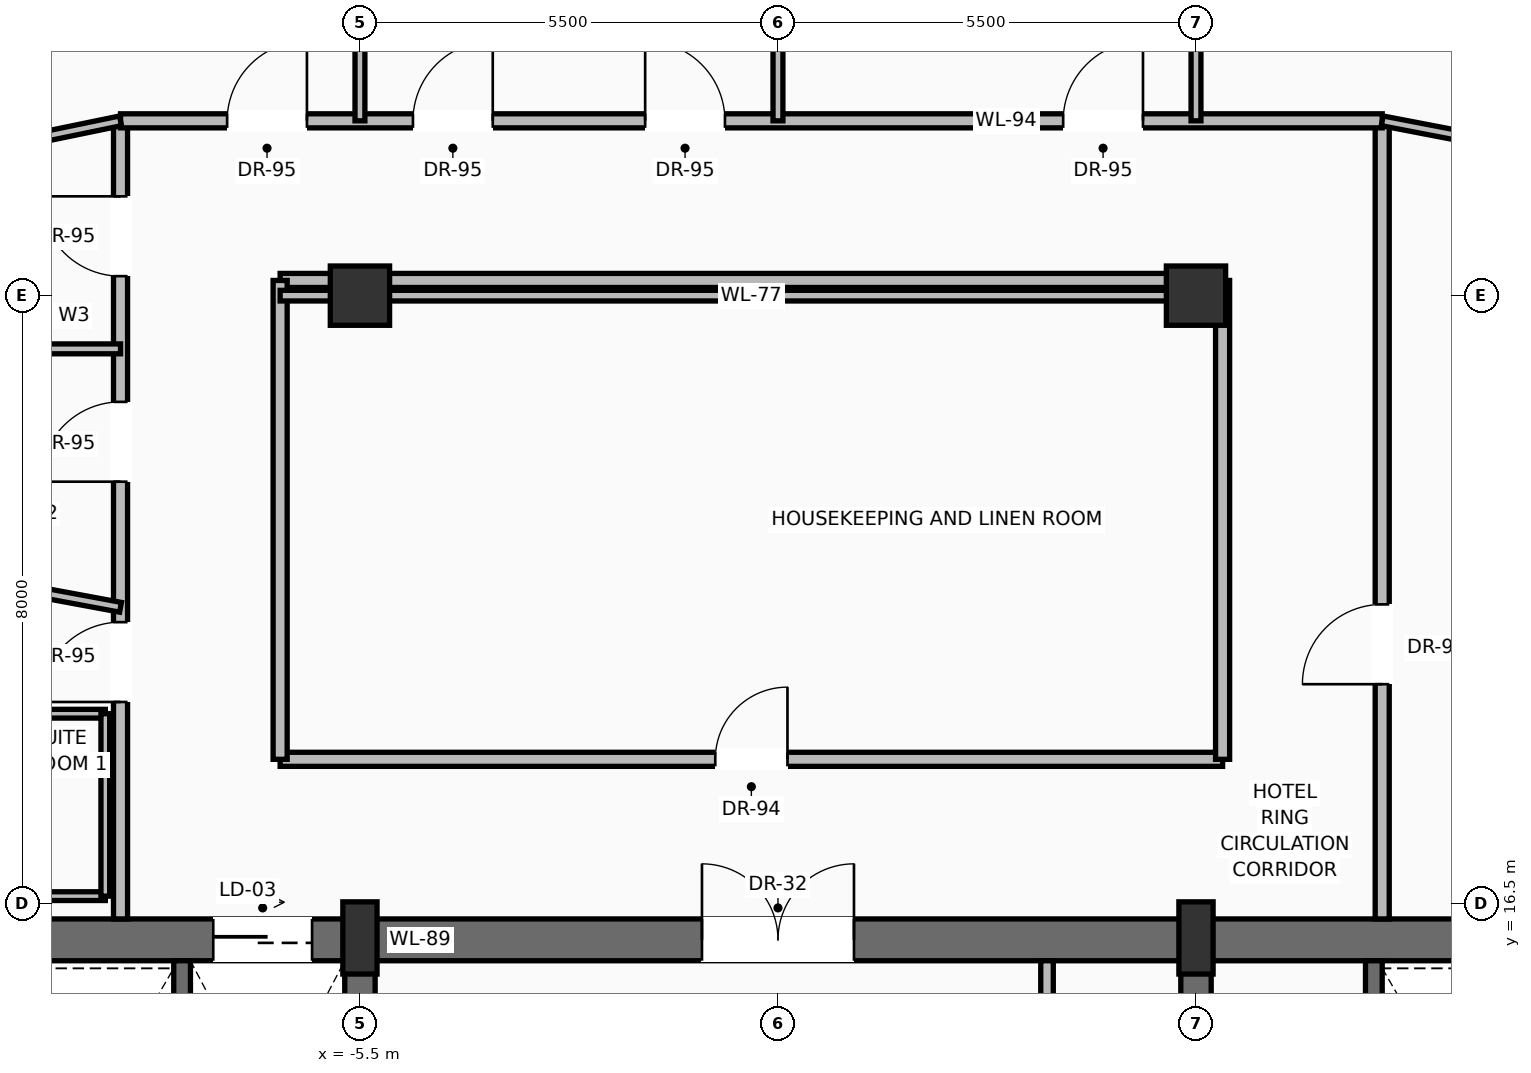
"""IFC4 building model, lengths in metres.
Left out: names, types, materials, properties, quantities, classifications, styles, units other than length and angle.
Written with IfcOpenShell. Run it as: python <this file> out.ifc"""

import sys

from ifc_helpers import new_model, si_unit, direction, frame, frame_2d, origin, origin_2d, place, context, subcontext, project, spatial, rectangle, extrude, source, transform, mapped, element, fill, save


model = new_model("IFC4")
c1 = context("Model", 3, precision=1e-05, world=origin(), true_north=direction((0.0, 1.0)))
c2 = subcontext(c1, "Body", "Model", "MODEL_VIEW")
j1 = project(units=[si_unit("LENGTHUNIT", "METRE"), si_unit("PLANEANGLEUNIT", "RADIAN")], contexts=[c1])
p1 = place(None, origin())
s1 = spatial("IfcSite", under=j1, at=p1, CompositionType="ELEMENT")
p2 = place(p1, origin())
s2 = spatial("IfcBuilding", under=s1, at=p2, CompositionType="ELEMENT")
p3 = place(p2, frame((0.0, 0.0, 230.35)))
s3 = spatial("IfcBuildingStorey", under=s2, at=p3, CompositionType="ELEMENT", Elevation=230.35)
p4 = place(p3, frame((-10.7, 16.025, 0.0), z_axis=(0.0, 0.0, 1.0), x_axis=(1.0, 0.0, 0.0)))
e1 = element("IfcWall", 1, at=p4, inside=s3, PredefinedType="SHEAR", context=c2, shape_type="SweptSolid", body=[
    extrude(rectangle(XDim=21.4, YDim=0.55, at=frame_2d((10.7, 0.0))), origin(), (0.0, 0.0, 1.0), 3.24),
])
p5 = place(p4, frame((3.27, 0.0, 0.0)))
e2 = element("IfcOpeningElement", 2, at=p5, cuts=e1, PredefinedType="OPENING", context=c2, shape_type="SweptSolid", body=[
    extrude(rectangle(XDim=1.3, YDim=2.3, at=frame_2d((0.65, 1.15))), frame((0.0, 0.285, 0.0), z_axis=(0.0, -1.0, 0.0), x_axis=(1.0, 0.0, 0.0)), (0.0, 0.0, 1.0), 0.57),
])
p6 = place(p4, frame((9.7, 0.0, 0.0)))
e3 = element("IfcOpeningElement", 3, at=p6, cuts=e1, PredefinedType="OPENING", context=c2, shape_type="SweptSolid", body=[
    extrude(rectangle(XDim=2.0, YDim=2.4, at=frame_2d((1.0, 1.2))), frame((0.0, 0.285, 0.0), z_axis=(0.0, -1.0, 0.0), x_axis=(1.0, 0.0, 0.0)), (0.0, 0.0, 1.0), 0.57),
])
p7 = place(p3, frame((-5.5, 0.575, 0.0), z_axis=(0.0, 0.0, 1.0), x_axis=(0.0, 1.0, 0.0)))
e4 = element("IfcWall", 4, at=p7, inside=s3, PredefinedType="SHEAR", context=c2, shape_type="SweptSolid", body=[
    extrude(rectangle(XDim=15.45, YDim=0.4, at=frame_2d((7.725, 0.0))), origin(), (0.0, 0.0, 1.0), 3.24),
])
p8 = place(p7, frame((8.925, 0.0, 0.0)))
e5 = element("IfcOpeningElement", 5, at=p8, cuts=e4, PredefinedType="OPENING", context=c2, shape_type="SweptSolid", body=[
    extrude(rectangle(XDim=1.1, YDim=2.2, at=frame_2d((0.55, 1.1))), frame((0.0, 0.21, 0.0), z_axis=(0.0, -1.0, 0.0), x_axis=(1.0, 0.0, 0.0)), (0.0, 0.0, 1.0), 0.42),
])
p9 = place(p3, frame((5.5, 0.575, 0.0), z_axis=(0.0, 0.0, 1.0), x_axis=(0.0, 1.0, 0.0)))
e6 = element("IfcWall", 6, at=p9, inside=s3, PredefinedType="SHEAR", context=c2, shape_type="SweptSolid", body=[
    extrude(rectangle(XDim=15.45, YDim=0.4, at=frame_2d((7.725, 0.0))), origin(), (0.0, 0.0, 1.0), 3.24),
])
p10 = place(p9, frame((8.925, 0.0, 0.0)))
e7 = element("IfcOpeningElement", 7, at=p10, cuts=e6, PredefinedType="OPENING", context=c2, shape_type="SweptSolid", body=[
    extrude(rectangle(XDim=1.1, YDim=2.2, at=frame_2d((0.55, 1.1))), frame((0.0, 0.21, 0.0), z_axis=(0.0, -1.0, 0.0), x_axis=(1.0, 0.0, 0.0)), (0.0, 0.0, 1.0), 0.42),
])
m1 = source(origin(), c2, "Body", "SweptSolid", [
    extrude(rectangle(XDim=0.45, YDim=0.95, at=origin_2d()), origin(), (0.0, 0.0, 1.0), 3.45),
])
for number, where, z_axis, x_axis in (
    (8, (-5.5, 16.05, 0.0), (0.0, 0.0, 1.0), (1.0, 0.0, 0.0)),
    (9, (5.5, 16.05, 0.0), (0.0, 0.0, 1.0), (1.0, 0.0, 0.0)),
):
    element("IfcColumn", number, at=place(p3, frame(where, z_axis=z_axis, x_axis=x_axis)), inside=s3, PredefinedType="PILASTER", context=c2, shape_type="MappedRepresentation", body=[
        mapped(m1, transform((0.0, 0.0, 0.0), scale=1.0)),
    ])
m2 = source(origin(), c2, "Body", "SweptSolid", [
    extrude(rectangle(XDim=0.78, YDim=0.78, at=origin_2d()), origin(), (0.0, 0.0, 1.0), 3.45),
])
for number, where, z_axis, x_axis in (
    (10, (-5.5, 24.5, 0.0), (0.0, 0.0, 1.0), (1.0, 0.0, 0.0)),
    (11, (5.5, 24.5, 0.0), (0.0, 0.0, 1.0), (1.0, 0.0, 0.0)),
):
    element("IfcColumn", number, at=place(p3, frame(where, z_axis=z_axis, x_axis=x_axis)), inside=s3, PredefinedType="COLUMN", context=c2, shape_type="MappedRepresentation", body=[
        mapped(m2, transform((0.0, 0.0, 0.0), scale=1.0)),
    ])
p11 = place(p3, frame((-19.586, 15.3, 0.0), z_axis=(0.0, 0.0, 1.0), x_axis=(0.510822157644, 0.859686409838, 0.0)))
e12 = element("IfcWall", 12, at=p11, inside=s3, PredefinedType="SOLIDWALL", context=c2, shape_type="SweptSolid", body=[
    extrude(rectangle(XDim=19.464, YDim=0.28, at=frame_2d((9.732, 0.0))), origin(), (0.0, 0.0, 1.0), 2.82),
])
p12 = place(p11, frame((4.671, 0.0, 0.0)))
e13 = element("IfcOpeningElement", 13, at=p12, cuts=e12, PredefinedType="OPENING", context=c2, shape_type="SweptSolid", body=[
    extrude(rectangle(XDim=1.6, YDim=2.35, at=frame_2d((0.8, 1.175))), frame((0.0, 0.15, 0.0), z_axis=(0.0, -1.0, 0.0), x_axis=(1.0, 0.0, 0.0)), (0.0, 0.0, 1.0), 0.3),
])
p13 = place(p11, frame((13.236, 0.0, 0.9)))
e14 = element("IfcOpeningElement", 14, at=p13, cuts=e12, PredefinedType="OPENING", context=c2, shape_type="SweptSolid", body=[
    extrude(rectangle(XDim=1.55, YDim=1.75, at=frame_2d((0.775, 0.875))), frame((0.0, 0.15, 0.0), z_axis=(0.0, -1.0, 0.0), x_axis=(1.0, 0.0, 0.0)), (0.0, 0.0, 1.0), 0.3),
])
p14 = place(p3, frame((8.708, 32.125, 0.0), z_axis=(0.0, 0.0, 1.0), x_axis=(0.527896829345, -0.849308505531, 0.0)))
e15 = element("IfcWall", 15, at=p14, inside=s3, PredefinedType="SOLIDWALL", context=c2, shape_type="SweptSolid", body=[
    extrude(rectangle(XDim=19.527, YDim=0.28, at=frame_2d((9.763, 0.0))), origin(), (0.0, 0.0, 1.0), 2.82),
])
p15 = place(p14, frame((4.686, 0.0, 0.0)))
e16 = element("IfcOpeningElement", 16, at=p15, cuts=e15, PredefinedType="OPENING", context=c2, shape_type="SweptSolid", body=[
    extrude(rectangle(XDim=1.6, YDim=2.35, at=frame_2d((0.8, 1.175))), frame((0.0, 0.15, 0.0), z_axis=(0.0, -1.0, 0.0), x_axis=(1.0, 0.0, 0.0)), (0.0, 0.0, 1.0), 0.3),
])
p16 = place(p14, frame((13.278, 0.0, 0.9)))
e17 = element("IfcOpeningElement", 17, at=p16, cuts=e15, PredefinedType="OPENING", context=c2, shape_type="SweptSolid", body=[
    extrude(rectangle(XDim=1.55, YDim=1.75, at=frame_2d((0.775, 0.875))), frame((0.0, 0.15, 0.0), z_axis=(0.0, -1.0, 0.0), x_axis=(1.0, 0.0, 0.0)), (0.0, 0.0, 1.0), 0.3),
])
for number, where, z_axis, x_axis in (
    (18, (-7.84, 11.87, 0.0), (0.0, 0.0, 1.0), (0.0, 1.0, 0.0)),
    (19, (7.84, 11.87, 0.0), (0.0, 0.0, 1.0), (0.0, 1.0, 0.0)),
):
    element("IfcWall", number, at=place(p3, frame(where, z_axis=z_axis, x_axis=x_axis)), inside=s3, PredefinedType="SOLIDWALL", context=c2, shape_type="SweptSolid", body=[
        extrude(rectangle(XDim=3.88, YDim=0.22, at=frame_2d((1.94, 0.0))), origin(), (0.0, 0.0, 1.0), 3.24),
    ])
p17 = place(p3, frame((3.54, 11.22, 0.0), z_axis=(0.0, 0.0, 1.0), x_axis=(0.0, 1.0, 0.0)))
e20 = element("IfcWall", 20, at=p17, inside=s3, PredefinedType="PARTITIONING", context=c2, shape_type="SweptSolid", body=[
    extrude(rectangle(XDim=4.53, YDim=0.165, at=frame_2d((2.265, 0.0))), origin(), (0.0, 0.0, 1.0), 3.232),
])
p18 = place(p17, frame((1.25, 0.0, 0.0)))
e21 = element("IfcOpeningElement", 21, at=p18, cuts=e20, PredefinedType="OPENING", context=c2, shape_type="SweptSolid", body=[
    extrude(rectangle(XDim=0.9, YDim=2.1, at=frame_2d((0.45, 1.05))), frame((0.0, 0.093, 0.0), z_axis=(0.0, -1.0, 0.0), x_axis=(1.0, 0.0, 0.0)), (0.0, 0.0, 1.0), 0.185),
])
p19 = place(p3, frame((-6.55, 18.4, 0.0), z_axis=(0.0, 0.0, 1.0), x_axis=(1.0, 0.0, 0.0)))
e22 = element("IfcWall", 22, at=p19, inside=s3, PredefinedType="PARTITIONING", context=c2, shape_type="SweptSolid", body=[
    extrude(rectangle(XDim=12.4, YDim=0.185, at=frame_2d((6.2, 0.0))), origin(), (0.0, 0.0, 1.0), 3.232),
])
p20 = place(p19, frame((5.725, 0.0, 0.0)))
e23 = element("IfcOpeningElement", 23, at=p20, cuts=e22, PredefinedType="OPENING", context=c2, shape_type="SweptSolid", body=[
    extrude(rectangle(XDim=0.95, YDim=2.2, at=frame_2d((0.475, 1.1))), frame((0.0, 0.103, 0.0), z_axis=(0.0, -1.0, 0.0), x_axis=(1.0, 0.0, 0.0)), (0.0, 0.0, 1.0), 0.205),
])
p21 = place(p3, frame((-6.55, 24.7, 0.0), z_axis=(0.0, 0.0, 1.0), x_axis=(1.0, 0.0, 0.0)))
e24 = element("IfcWall", 24, at=p21, inside=s3, PredefinedType="PARTITIONING", context=c2, shape_type="SweptSolid", body=[
    extrude(rectangle(XDim=12.4, YDim=0.185, at=frame_2d((6.2, 0.0))), origin(), (0.0, 0.0, 1.0), 2.683),
])
for number, where, z_axis, x_axis in (
    (25, (-6.55, 18.4, 0.0), (0.0, 0.0, 1.0), (0.0, 1.0, 0.0)),
    (26, (5.85, 18.4, 0.0), (0.0, 0.0, 1.0), (0.0, 1.0, 0.0)),
):
    element("IfcWall", number, at=place(p3, frame(where, z_axis=z_axis, x_axis=x_axis)), inside=s3, PredefinedType="PARTITIONING", context=c2, shape_type="SweptSolid", body=[
        extrude(rectangle(XDim=6.3, YDim=0.185, at=frame_2d((3.15, 0.0))), origin(), (0.0, 0.0, 1.0), 3.232),
    ])
p22 = place(p3, frame((-8.65, 16.3, 0.0), z_axis=(0.0, 0.0, 1.0), x_axis=(0.0, 1.0, 0.0)))
e27 = element("IfcWall", 27, at=p22, inside=s3, PredefinedType="PARTITIONING", context=c2, shape_type="SweptSolid", body=[
    extrude(rectangle(XDim=10.5, YDim=0.185, at=frame_2d((5.25, 0.0))), origin(), (0.0, 0.0, 1.0), 3.232),
])
p23 = place(p22, frame((2.854, 0.0, 0.0)))
e28 = element("IfcOpeningElement", 28, at=p23, cuts=e27, PredefinedType="OPENING", context=c2, shape_type="SweptSolid", body=[
    extrude(rectangle(XDim=1.05, YDim=2.25, at=frame_2d((0.525, 1.125))), frame((0.0, 0.103, 0.0), z_axis=(0.0, -1.0, 0.0), x_axis=(1.0, 0.0, 0.0)), (0.0, 0.0, 1.0), 0.205),
])
p24 = place(p22, frame((5.752, 0.0, 0.0)))
e29 = element("IfcOpeningElement", 29, at=p24, cuts=e27, PredefinedType="OPENING", context=c2, shape_type="SweptSolid", body=[
    extrude(rectangle(XDim=1.05, YDim=2.25, at=frame_2d((0.525, 1.125))), frame((0.0, 0.103, 0.0), z_axis=(0.0, -1.0, 0.0), x_axis=(1.0, 0.0, 0.0)), (0.0, 0.0, 1.0), 0.205),
])
p25 = place(p22, frame((8.457, 0.0, 0.0)))
e30 = element("IfcOpeningElement", 30, at=p25, cuts=e27, PredefinedType="OPENING", context=c2, shape_type="SweptSolid", body=[
    extrude(rectangle(XDim=1.05, YDim=2.25, at=frame_2d((0.525, 1.125))), frame((0.0, 0.103, 0.0), z_axis=(0.0, -1.0, 0.0), x_axis=(1.0, 0.0, 0.0)), (0.0, 0.0, 1.0), 0.205),
])
p26 = place(p3, frame((7.95, 16.3, 0.0), z_axis=(0.0, 0.0, 1.0), x_axis=(0.0, 1.0, 0.0)))
e31 = element("IfcWall", 31, at=p26, inside=s3, PredefinedType="PARTITIONING", context=c2, shape_type="SweptSolid", body=[
    extrude(rectangle(XDim=10.5, YDim=0.185, at=frame_2d((5.25, 0.0))), origin(), (0.0, 0.0, 1.0), 3.232),
])
p27 = place(p26, frame((3.088, 0.0, 0.0)))
e32 = element("IfcOpeningElement", 32, at=p27, cuts=e31, PredefinedType="OPENING", context=c2, shape_type="SweptSolid", body=[
    extrude(rectangle(XDim=1.05, YDim=2.25, at=frame_2d((0.525, 1.125))), frame((0.0, 0.103, 0.0), z_axis=(0.0, -1.0, 0.0), x_axis=(1.0, 0.0, 0.0)), (0.0, 0.0, 1.0), 0.205),
])
p28 = place(p3, frame((-8.65, 26.8, 0.0), z_axis=(0.0, 0.0, 1.0), x_axis=(1.0, 0.0, 0.0)))
e33 = element("IfcWall", 33, at=p28, inside=s3, PredefinedType="PARTITIONING", context=c2, shape_type="SweptSolid", body=[
    extrude(rectangle(XDim=16.6, YDim=0.185, at=frame_2d((8.3, 0.0))), origin(), (0.0, 0.0, 1.0), 3.232),
])
p29 = place(p28, frame((3.847, 0.0, 0.0)))
e34 = element("IfcOpeningElement", 34, at=p29, cuts=e33, PredefinedType="OPENING", context=c2, shape_type="SweptSolid", body=[
    extrude(rectangle(XDim=1.05, YDim=2.25, at=frame_2d((0.525, 1.125))), frame((0.0, 0.103, 0.0), z_axis=(0.0, -1.0, 0.0), x_axis=(1.0, 0.0, 0.0)), (0.0, 0.0, 1.0), 0.205),
])
p30 = place(p28, frame((6.903, 0.0, 0.0)))
e35 = element("IfcOpeningElement", 35, at=p30, cuts=e33, PredefinedType="OPENING", context=c2, shape_type="SweptSolid", body=[
    extrude(rectangle(XDim=1.05, YDim=2.25, at=frame_2d((0.525, 1.125))), frame((0.0, 0.103, 0.0), z_axis=(0.0, -1.0, 0.0), x_axis=(1.0, 0.0, 0.0)), (0.0, 0.0, 1.0), 0.205),
])
p31 = place(p28, frame((12.403, 0.0, 0.0)))
e36 = element("IfcOpeningElement", 36, at=p31, cuts=e33, PredefinedType="OPENING", context=c2, shape_type="SweptSolid", body=[
    extrude(rectangle(XDim=1.05, YDim=2.25, at=frame_2d((0.525, 1.125))), frame((0.0, 0.103, 0.0), z_axis=(0.0, -1.0, 0.0), x_axis=(1.0, 0.0, 0.0)), (0.0, 0.0, 1.0), 0.205),
])
p32 = place(p28, frame((1.403, 0.0, 0.0)))
e37 = element("IfcOpeningElement", 37, at=p32, cuts=e33, PredefinedType="OPENING", context=c2, shape_type="SweptSolid", body=[
    extrude(rectangle(XDim=1.05, YDim=2.25, at=frame_2d((0.525, 1.125))), frame((0.0, 0.103, 0.0), z_axis=(0.0, -1.0, 0.0), x_axis=(1.0, 0.0, 0.0)), (0.0, 0.0, 1.0), 0.205),
])
p33 = place(p3, frame((-6.55, 24.5, 0.0), z_axis=(0.0, 0.0, 1.0), x_axis=(1.0, 0.0, 0.0)))
e38 = element("IfcWall", 38, at=p33, inside=s3, PredefinedType="PARTITIONING", context=c2, shape_type="SweptSolid", body=[
    extrude(rectangle(XDim=12.4, YDim=0.14, at=frame_2d((6.2, 0.0))), origin(), (0.0, 0.0, 1.0), 2.683),
])
p34 = place(p3, frame((-13.499, 25.799, 0.0), z_axis=(0.0, 0.0, 1.0), x_axis=(0.979359822394, 0.202124561301, 0.0)))
e39 = element("IfcWall", 39, at=p34, inside=s3, PredefinedType="PARTITIONING", context=c2, shape_type="SweptSolid", body=[
    extrude(rectangle(XDim=4.951, YDim=0.13, at=frame_2d((2.476, 0.0))), origin(), (0.0, 0.0, 1.0), 3.232),
])
p35 = place(p3, frame((7.95, 26.8, 0.0), z_axis=(0.0, 0.0, 1.0), x_axis=(0.982004306454, -0.188858524049, 0.0)))
e40 = element("IfcWall", 40, at=p35, inside=s3, PredefinedType="PARTITIONING", context=c2, shape_type="SweptSolid", body=[
    extrude(rectangle(XDim=4.881, YDim=0.13, at=frame_2d((2.441, 0.0))), origin(), (0.0, 0.0, 1.0), 3.232),
])
p36 = place(p35, frame((1.927, 0.0, 0.0)))
e41 = element("IfcOpeningElement", 41, at=p36, cuts=e40, PredefinedType="OPENING", context=c2, shape_type="SweptSolid", body=[
    extrude(rectangle(XDim=0.95, YDim=2.2, at=frame_2d((0.475, 1.1))), frame((0.0, 0.075, 0.0), z_axis=(0.0, -1.0, 0.0), x_axis=(1.0, 0.0, 0.0)), (0.0, 0.0, 1.0), 0.15),
])
p37 = place(p3, frame((-5.5, 26.8, 0.0), z_axis=(0.0, 0.0, 1.0), x_axis=(0.0, 1.0, 0.0)))
e42 = element("IfcWall", 42, at=p37, inside=s3, PredefinedType="PARTITIONING", context=c2, shape_type="SweptSolid", body=[
    extrude(rectangle(XDim=12.461, YDim=0.13, at=frame_2d((6.23, 0.0))), origin(), (0.0, 0.0, 1.0), 2.683),
])
p38 = place(p3, frame((5.5, 26.8, 0.0), z_axis=(0.0, 0.0, 1.0), x_axis=(0.0, 1.0, 0.0)))
e43 = element("IfcWall", 43, at=p38, inside=s3, PredefinedType="PARTITIONING", context=c2, shape_type="SweptSolid", body=[
    extrude(rectangle(XDim=10.732, YDim=0.13, at=frame_2d((5.366, 0.0))), origin(), (0.0, 0.0, 1.0), 2.683),
])
p39 = place(p3, frame((0.0, 26.8, 0.0), z_axis=(0.0, 0.0, 1.0), x_axis=(0.0, 1.0, 0.0)))
e44 = element("IfcWall", 44, at=p39, inside=s3, PredefinedType="PARTITIONING", context=c2, shape_type="SweptSolid", body=[
    extrude(rectangle(XDim=15.943, YDim=0.13, at=frame_2d((7.971, 0.0))), origin(), (0.0, 0.0, 1.0), 3.232),
])
for number, where, z_axis, x_axis in (
    (45, (-11.5, 16.6, 0.0), (0.0, 0.0, 1.0), (1.0, 0.0, 0.0)),
    (46, (-11.5, 19.0, 0.0), (0.0, 0.0, 1.0), (1.0, 0.0, 0.0)),
):
    element("IfcWall", number, at=place(p3, frame(where, z_axis=z_axis, x_axis=x_axis)), inside=s3, PredefinedType="PARTITIONING", context=c2, shape_type="SweptSolid", body=[
        extrude(rectangle(XDim=2.65, YDim=0.115, at=frame_2d((1.325, 0.0))), origin(), (0.0, 0.0, 1.0), 3.232),
    ])
p40 = place(p3, frame((-8.85, 16.6, 0.0), z_axis=(0.0, 0.0, 1.0), x_axis=(0.0, 1.0, 0.0)))
e47 = element("IfcWall", 47, at=p40, inside=s3, PredefinedType="PARTITIONING", context=c2, shape_type="SweptSolid", body=[
    extrude(rectangle(XDim=2.4, YDim=0.115, at=frame_2d((1.2, 0.0))), origin(), (0.0, 0.0, 1.0), 3.232),
])
p41 = place(p3, frame((-15.907, 21.747, 0.0), z_axis=(0.0, 0.0, 1.0), x_axis=(0.98321459924, -0.182452875674, 0.0)))
e48 = element("IfcWall", 48, at=p41, inside=s3, PredefinedType="PARTITIONING", context=c2, shape_type="SweptSolid", body=[
    extrude(rectangle(XDim=7.381, YDim=0.13, at=frame_2d((3.69, 0.0))), origin(), (0.0, 0.0, 1.0), 3.232),
])
p42 = place(p3, frame((-14.687, 23.8, 0.0), z_axis=(0.0, 0.0, 1.0), x_axis=(1.0, 0.0, 0.0)))
e49 = element("IfcWall", 49, at=p42, inside=s3, PredefinedType="PARTITIONING", context=c2, shape_type="SweptSolid", body=[
    extrude(rectangle(XDim=6.037, YDim=0.13, at=frame_2d((3.019, 0.0))), origin(), (0.0, 0.0, 1.0), 3.232),
])
m3 = source(origin(), c2, "Body", "SweptSolid", [
    extrude(rectangle(XDim=1.3, YDim=2.3, at=frame_2d((0.65, 1.15))), frame((0.0, 0.025, 0.0), z_axis=(0.0, -1.0, 0.0), x_axis=(1.0, 0.0, 0.0)), (0.0, 0.0, 1.0), 0.05),
])
p43 = place(p5, origin())
e50 = element("IfcDoor", 50, at=p43, inside=s3, OperationType="SLIDING_TO_RIGHT", PredefinedType="DOOR", context=c2, shape_type="MappedRepresentation", body=[
    mapped(m3, transform((0.0, 0.0, 0.0), scale=1.0)),
])
fill(e2, e50)
m4 = source(origin(), c2, "Body", "SweptSolid", [
    extrude(rectangle(XDim=2.0, YDim=2.4, at=frame_2d((1.0, 1.2))), frame((0.0, 0.025, 0.0), z_axis=(0.0, -1.0, 0.0), x_axis=(1.0, 0.0, 0.0)), (0.0, 0.0, 1.0), 0.05),
])
p44 = place(p6, origin())
e51 = element("IfcDoor", 51, at=p44, inside=s3, OperationType="DOUBLE_DOOR_SINGLE_SWING", PredefinedType="DOOR", context=c2, shape_type="MappedRepresentation", body=[
    mapped(m4, transform((0.0, 0.0, 0.0), scale=1.0)),
])
fill(e3, e51)
m5 = source(origin(), c2, "Body", "SweptSolid", [
    extrude(rectangle(XDim=0.95, YDim=2.2, at=frame_2d((0.475, 1.1))), frame((0.0, 0.025, 0.0), z_axis=(0.0, -1.0, 0.0), x_axis=(1.0, 0.0, 0.0)), (0.0, 0.0, 1.0), 0.05),
])
p45 = place(p20, origin())
e52 = element("IfcDoor", 52, at=p45, inside=s3, OperationType="SINGLE_SWING_RIGHT", PredefinedType="DOOR", context=c2, shape_type="MappedRepresentation", body=[
    mapped(m5, transform((0.0, 0.0, 0.0), scale=1.0)),
])
fill(e23, e52)
m6 = source(origin(), c2, "Body", "SweptSolid", [
    extrude(rectangle(XDim=1.05, YDim=2.25, at=frame_2d((0.525, 1.125))), frame((0.0, 0.025, 0.0), z_axis=(0.0, -1.0, 0.0), x_axis=(1.0, 0.0, 0.0)), (0.0, 0.0, 1.0), 0.05),
])
p46 = place(p23, origin())
e53 = element("IfcDoor", 53, at=p46, inside=s3, OperationType="SINGLE_SWING_LEFT", PredefinedType="DOOR", context=c2, shape_type="MappedRepresentation", body=[
    mapped(m6, transform((0.0, 0.0, 0.0), scale=1.0)),
])
fill(e28, e53)
p47 = place(p24, origin())
e54 = element("IfcDoor", 54, at=p47, inside=s3, OperationType="SINGLE_SWING_LEFT", PredefinedType="DOOR", context=c2, shape_type="MappedRepresentation", body=[
    mapped(m6, transform((0.0, 0.0, 0.0), scale=1.0)),
])
fill(e29, e54)
p48 = place(p25, origin())
e55 = element("IfcDoor", 55, at=p48, inside=s3, OperationType="SINGLE_SWING_RIGHT", PredefinedType="DOOR", context=c2, shape_type="MappedRepresentation", body=[
    mapped(m6, transform((0.0, 0.0, 0.0), scale=1.0)),
])
fill(e30, e55)
p49 = place(p27, origin())
e56 = element("IfcDoor", 56, at=p49, inside=s3, OperationType="SINGLE_SWING_LEFT", PredefinedType="DOOR", context=c2, shape_type="MappedRepresentation", body=[
    mapped(m6, transform((0.0, 0.0, 0.0), scale=1.0)),
])
fill(e32, e56)
p50 = place(p29, origin())
e57 = element("IfcDoor", 57, at=p50, inside=s3, OperationType="SINGLE_SWING_RIGHT", PredefinedType="DOOR", context=c2, shape_type="MappedRepresentation", body=[
    mapped(m6, transform((0.0, 0.0, 0.0), scale=1.0)),
])
fill(e34, e57)
p51 = place(p30, origin())
e58 = element("IfcDoor", 58, at=p51, inside=s3, OperationType="SINGLE_SWING_LEFT", PredefinedType="DOOR", context=c2, shape_type="MappedRepresentation", body=[
    mapped(m6, transform((0.0, 0.0, 0.0), scale=1.0)),
])
fill(e35, e58)
p52 = place(p31, origin())
e59 = element("IfcDoor", 59, at=p52, inside=s3, OperationType="SINGLE_SWING_RIGHT", PredefinedType="DOOR", context=c2, shape_type="MappedRepresentation", body=[
    mapped(m6, transform((0.0, 0.0, 0.0), scale=1.0)),
])
fill(e36, e59)
p53 = place(p32, origin())
e60 = element("IfcDoor", 60, at=p53, inside=s3, OperationType="SINGLE_SWING_RIGHT", PredefinedType="DOOR", context=c2, shape_type="MappedRepresentation", body=[
    mapped(m6, transform((0.0, 0.0, 0.0), scale=1.0)),
])
fill(e37, e60)
save(model, sys.argv[1])
